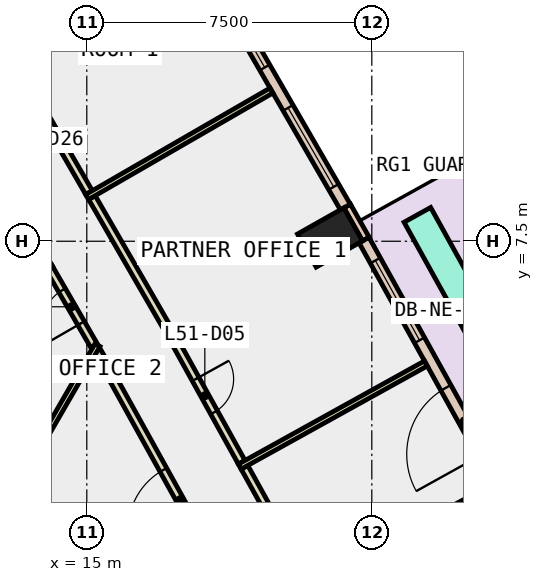
"""IFC4 building model, lengths in metres.
Left out: names, types, materials, properties, quantities, classifications, styles, units other than length and angle.
Written with IfcOpenShell. Run it as: python <this file> out.ifc"""

import sys

from ifc_helpers import new_model, si_unit, direction, frame, frame_2d, origin, origin_2d, place, context, subcontext, project, spatial, rectangle, extrude, element, fill, save


model = new_model("IFC4")
c1 = context("Model", 3, precision=1e-05, world=origin(), true_north=direction((0.0, 1.0)))
c2 = subcontext(c1, "Body", "Model", "MODEL_VIEW")
j1 = project(units=[si_unit("LENGTHUNIT", "METRE"), si_unit("PLANEANGLEUNIT", "RADIAN")], contexts=[c1])
p1 = place(None, origin())
s1 = spatial("IfcSite", under=j1, at=p1, CompositionType="ELEMENT")
p2 = place(p1, origin())
s2 = spatial("IfcBuilding", under=s1, at=p2, CompositionType="ELEMENT")
p3 = place(p2, frame((0.0, 0.0, 227.6)))
s3 = spatial("IfcBuildingStorey", under=s2, at=p3, CompositionType="ELEMENT", Elevation=227.6)
for number, where, z_axis, x_axis in (
    (1, (25.395, 0.391, -0.4), (0.0, 0.0, 1.0), (-0.474, 0.88, 0.0)),
    (2, (21.4, 7.599, -0.4), (0.0, 0.0, 1.0), (-0.491, 0.871, 0.0)),
):
    element("IfcColumn", number, at=place(p3, frame(where, z_axis=z_axis, x_axis=x_axis)), inside=s3, PredefinedType="COLUMN", context=c2, shape_type="SweptSolid", body=[
        extrude(rectangle(XDim=1.0, YDim=1.4, at=origin_2d()), origin(), (0.0, 0.0, 1.0), 4.2),
    ])
p4 = place(p3, frame((22.343, 7.556, 0.0), z_axis=(0.0, 0.0, 1.0), x_axis=(-0.491743606947, 0.87074004446, 0.0)))
e3 = element("IfcWall", 3, at=p4, inside=s3, PredefinedType="STANDARD", context=c2, shape_type="SweptSolid", body=[
    extrude(rectangle(XDim=1.0, YDim=0.2, at=frame_2d((0.5, 0.0))), origin(), (0.0, 0.0, 1.0), 3.8),
])
p5 = place(p3, frame((25.813, 1.183, 0.0), z_axis=(0.0, 0.0, 1.0), x_axis=(-0.484742980126, 0.874656643043, 0.0)))
e4 = element("IfcWall", 4, at=p5, inside=s3, PredefinedType="STANDARD", context=c2, shape_type="SweptSolid", body=[
    extrude(rectangle(XDim=7.258, YDim=0.3, at=frame_2d((3.629, 0.0))), origin(), (0.0, 0.0, 1.0), 3.8),
])
p6 = place(p5, frame((0.814, 0.0, 0.0)))
e5 = element("IfcOpeningElement", 5, at=p6, cuts=e4, PredefinedType="OPENING", context=c2, shape_type="SweptSolid", body=[
    extrude(rectangle(XDim=2.0, YDim=2.4, at=frame_2d((1.0, 1.2))), frame((0.0, 0.16, 0.0), z_axis=(0.0, -1.0, 0.0), x_axis=(1.0, 0.0, 0.0)), (0.0, 0.0, 1.0), 0.32),
])
p7 = place(p5, frame((4.243, 0.0, 0.9)))
e6 = element("IfcOpeningElement", 6, at=p7, cuts=e4, PredefinedType="OPENING", context=c2, shape_type="SweptSolid", body=[
    extrude(rectangle(XDim=2.4, YDim=2.6, at=frame_2d((1.2, 1.3))), frame((0.0, 0.16, 0.0), z_axis=(0.0, -1.0, 0.0), x_axis=(1.0, 0.0, 0.0)), (0.0, 0.0, 1.0), 0.32),
])
p8 = place(p3, frame((21.804, 8.399, 0.0), z_axis=(0.0, 0.0, 1.0), x_axis=(-0.500075798504, 0.865981637075, 0.0)))
e7 = element("IfcWall", 7, at=p8, inside=s3, PredefinedType="STANDARD", context=c2, shape_type="SweptSolid", body=[
    extrude(rectangle(XDim=7.257, YDim=0.3, at=frame_2d((3.628, 0.0))), origin(), (0.0, 0.0, 1.0), 3.8),
])
p9 = place(p8, frame((0.614, 0.0, 0.9)))
e8 = element("IfcOpeningElement", 8, at=p9, cuts=e7, PredefinedType="OPENING", context=c2, shape_type="SweptSolid", body=[
    extrude(rectangle(XDim=2.4, YDim=2.6, at=frame_2d((1.2, 1.3))), frame((0.0, 0.16, 0.0), z_axis=(0.0, -1.0, 0.0), x_axis=(1.0, 0.0, 0.0)), (0.0, 0.0, 1.0), 0.32),
])
p10 = place(p8, frame((4.242, 0.0, 0.9)))
e9 = element("IfcOpeningElement", 9, at=p10, cuts=e7, PredefinedType="OPENING", context=c2, shape_type="SweptSolid", body=[
    extrude(rectangle(XDim=2.4, YDim=2.6, at=frame_2d((1.2, 1.3))), frame((0.0, 0.16, 0.0), z_axis=(0.0, -1.0, 0.0), x_axis=(1.0, 0.0, 0.0)), (0.0, 0.0, 1.0), 0.32),
])
p11 = place(p3, frame((27.121, 2.021, 0.0), z_axis=(0.0, 0.0, 1.0), x_axis=(-0.484785237665, 0.874633222181, 0.0)))
e10 = element("IfcWall", 10, at=p11, inside=s3, PredefinedType="STANDARD", context=c2, shape_type="SweptSolid", body=[
    extrude(rectangle(XDim=7.059, YDim=0.8, at=frame_2d((3.53, 0.0))), origin(), (0.0, 0.0, 1.0), 0.8),
])
p12 = place(p3, frame((15.194, 4.747, 0.0), z_axis=(0.0, 0.0, 1.0), x_axis=(-0.500140598757, 0.865944213836, 0.0)))
e11 = element("IfcWall", 11, at=p12, inside=s3, PredefinedType="PARTITIONING", context=c2, shape_type="SweptSolid", body=[
    extrude(rectangle(XDim=2.375, YDim=0.2, at=frame_2d((1.188, 0.0))), origin(), (0.0, 0.0, 1.0), 3.8),
])
p13 = place(p12, frame((0.688, 0.0, 0.0)))
e12 = element("IfcOpeningElement", 12, at=p13, cuts=e11, PredefinedType="OPENING", context=c2, shape_type="SweptSolid", body=[
    extrude(rectangle(XDim=1.0, YDim=2.1, at=frame_2d((0.5, 1.05))), frame((0.0, 0.11, 0.0), z_axis=(0.0, -1.0, 0.0), x_axis=(1.0, 0.0, 0.0)), (0.0, 0.0, 1.0), 0.22),
])
p14 = place(p3, frame((19.419, -2.856, 0.0), z_axis=(0.0, 0.0, 1.0), x_axis=(-0.484683114876, 0.874689818252, 0.0)))
e13 = element("IfcWall", 13, at=p14, inside=s3, PredefinedType="PARTITIONING", context=c2, shape_type="SweptSolid", body=[
    extrude(rectangle(XDim=8.123, YDim=0.2, at=frame_2d((4.062, 0.0))), origin(), (0.0, 0.0, 1.0), 3.8),
])
p15 = place(p14, frame((3.161, 0.0, 0.0)))
e14 = element("IfcOpeningElement", 14, at=p15, cuts=e13, PredefinedType="OPENING", context=c2, shape_type="SweptSolid", body=[
    extrude(rectangle(XDim=1.8, YDim=2.1, at=frame_2d((0.9, 1.05))), frame((0.0, 0.11, 0.0), z_axis=(0.0, -1.0, 0.0), x_axis=(1.0, 0.0, 0.0)), (0.0, 0.0, 1.0), 0.22),
])
p16 = place(p3, frame((15.482, 4.249, 0.0), z_axis=(0.0, 0.0, 1.0), x_axis=(-0.500832493767, 0.865544229481, 0.0)))
e15 = element("IfcWall", 15, at=p16, inside=s3, PredefinedType="PARTITIONING", context=c2, shape_type="SweptSolid", body=[
    extrude(rectangle(XDim=0.425, YDim=0.2, at=frame_2d((0.212, 0.0))), origin(), (0.0, 0.0, 1.0), 3.8),
])
p17 = place(p3, frame((19.149, 1.553, 0.0), z_axis=(0.0, 0.0, 1.0), x_axis=(0.484622593188, -0.874723351793, 0.0)))
e16 = element("IfcWall", 16, at=p17, inside=s3, PredefinedType="PARTITIONING", context=c2, shape_type="SweptSolid", body=[
    extrude(rectangle(XDim=4.003, YDim=0.2, at=frame_2d((2.002, 0.0))), origin(), (0.0, 0.0, 1.0), 3.8),
])
p18 = place(p3, frame((15.135, 8.65, 0.0), z_axis=(0.0, 0.0, 1.0), x_axis=(0.500102734445, -0.865966081899, 0.0)))
e17 = element("IfcWall", 17, at=p18, inside=s3, PredefinedType="PARTITIONING", context=c2, shape_type="SweptSolid", body=[
    extrude(rectangle(XDim=4.001, YDim=0.2, at=frame_2d((2.0, 0.0))), origin(), (0.0, 0.0, 1.0), 3.8),
])
p19 = place(p3, frame((17.136, 5.185, 0.0), z_axis=(0.0, 0.0, 1.0), x_axis=(0.484679349661, -0.874691904623, 0.0)))
e18 = element("IfcWall", 18, at=p19, inside=s3, PredefinedType="PARTITIONING", context=c2, shape_type="SweptSolid", body=[
    extrude(rectangle(XDim=4.002, YDim=0.2, at=frame_2d((2.001, 0.0))), origin(), (0.0, 0.0, 1.0), 3.8),
])
p20 = place(p19, frame((1.501, 0.0, 0.0)))
e19 = element("IfcOpeningElement", 19, at=p20, cuts=e18, PredefinedType="OPENING", context=c2, shape_type="SweptSolid", body=[
    extrude(rectangle(XDim=1.0, YDim=2.1, at=frame_2d((0.5, 1.05))), frame((0.0, 0.11, 0.0), z_axis=(0.0, -1.0, 0.0), x_axis=(1.0, 0.0, 0.0)), (0.0, 0.0, 1.0), 0.22),
])
p21 = place(p3, frame((13.057, 12.247, 0.0), z_axis=(0.0, 0.0, 1.0), x_axis=(0.500093699572, -0.865971299552, 0.0)))
e20 = element("IfcWall", 20, at=p21, inside=s3, PredefinedType="PARTITIONING", context=c2, shape_type="SweptSolid", body=[
    extrude(rectangle(XDim=4.004, YDim=0.2, at=frame_2d((2.002, 0.0))), origin(), (0.0, 0.0, 1.0), 3.8),
])
p22 = place(p3, frame((19.025, 1.57, 0.0), z_axis=(0.0, 0.0, 1.0), x_axis=(0.874714019242, 0.484639437666, 0.0)))
e21 = element("IfcWall", 21, at=p22, inside=s3, PredefinedType="PARTITIONING", context=c2, shape_type="SweptSolid", body=[
    extrude(rectangle(XDim=5.6, YDim=0.15, at=frame_2d((2.8, 0.0))), origin(), (0.0, 0.0, 1.0), 3.8),
])
p23 = place(p3, frame((15.01, 8.665, 0.0), z_axis=(0.0, 0.0, 1.0), x_axis=(0.865961984968, 0.500109828528, 0.0)))
e22 = element("IfcWall", 22, at=p23, inside=s3, PredefinedType="PARTITIONING", context=c2, shape_type="SweptSolid", body=[
    extrude(rectangle(XDim=5.601, YDim=0.15, at=frame_2d((2.8, 0.0))), origin(), (0.0, 0.0, 1.0), 3.8),
])
p24 = place(p3, frame((9.597, -5.079, 0.0), z_axis=(0.0, 0.0, 1.0), x_axis=(0.499949193323, 0.866054735046, 0.0)))
e23 = element("IfcWall", 23, at=p24, inside=s3, PredefinedType="PARTITIONING", context=c2, shape_type="SweptSolid", body=[
    extrude(rectangle(XDim=11.371, YDim=0.15, at=frame_2d((5.686, 0.0))), origin(), (0.0, 0.0, 1.0), 3.8),
])
p25 = place(p6, origin())
e24 = element("IfcDoor", 24, at=p25, inside=s3, OperationType="SLIDING_TO_LEFT", PredefinedType="DOOR", context=c2, shape_type="SweptSolid", body=[
    extrude(rectangle(XDim=2.0, YDim=2.4, at=frame_2d((1.0, 1.2))), frame((0.0, 0.025, 0.0), z_axis=(0.0, -1.0, 0.0), x_axis=(1.0, 0.0, 0.0)), (0.0, 0.0, 1.0), 0.05),
])
fill(e5, e24)
p26 = place(p7, origin())
e25 = element("IfcWindow", 25, at=p26, inside=s3, PartitioningType="SINGLE_PANEL", PredefinedType="WINDOW", context=c2, shape_type="SweptSolid", body=[
    extrude(rectangle(XDim=2.4, YDim=2.6, at=frame_2d((1.2, 1.3))), frame((0.0, 0.03, 0.0), z_axis=(0.0, -1.0, 0.0), x_axis=(1.0, 0.0, 0.0)), (0.0, 0.0, 1.0), 0.06),
])
fill(e6, e25)
p27 = place(p9, origin())
e26 = element("IfcWindow", 26, at=p27, inside=s3, PartitioningType="SINGLE_PANEL", PredefinedType="WINDOW", context=c2, shape_type="SweptSolid", body=[
    extrude(rectangle(XDim=2.4, YDim=2.6, at=frame_2d((1.2, 1.3))), frame((0.0, 0.03, 0.0), z_axis=(0.0, -1.0, 0.0), x_axis=(1.0, 0.0, 0.0)), (0.0, 0.0, 1.0), 0.06),
])
fill(e8, e26)
p28 = place(p10, origin())
e27 = element("IfcWindow", 27, at=p28, inside=s3, PartitioningType="SINGLE_PANEL", PredefinedType="WINDOW", context=c2, shape_type="SweptSolid", body=[
    extrude(rectangle(XDim=2.4, YDim=2.6, at=frame_2d((1.2, 1.3))), frame((0.0, 0.03, 0.0), z_axis=(0.0, -1.0, 0.0), x_axis=(1.0, 0.0, 0.0)), (0.0, 0.0, 1.0), 0.06),
])
fill(e9, e27)
p29 = place(p20, origin())
e28 = element("IfcDoor", 28, at=p29, inside=s3, OperationType="SINGLE_SWING_LEFT", PredefinedType="DOOR", context=c2, shape_type="SweptSolid", body=[
    extrude(rectangle(XDim=1.0, YDim=2.1, at=frame_2d((0.5, 1.05))), frame((0.0, 0.025, 0.0), z_axis=(0.0, -1.0, 0.0), x_axis=(1.0, 0.0, 0.0)), (0.0, 0.0, 1.0), 0.05),
])
fill(e19, e28)
p30 = place(p15, origin())
e29 = element("IfcDoor", 29, at=p30, inside=s3, OperationType="DOUBLE_DOOR_SINGLE_SWING", PredefinedType="DOOR", context=c2, shape_type="SweptSolid", body=[
    extrude(rectangle(XDim=1.8, YDim=2.1, at=frame_2d((0.9, 1.05))), frame((0.0, 0.025, 0.0), z_axis=(0.0, -1.0, 0.0), x_axis=(1.0, 0.0, 0.0)), (0.0, 0.0, 1.0), 0.05),
])
fill(e14, e29)
p31 = place(p13, origin())
e30 = element("IfcDoor", 30, at=p31, inside=s3, OperationType="SINGLE_SWING_LEFT", PredefinedType="DOOR", context=c2, shape_type="SweptSolid", body=[
    extrude(rectangle(XDim=1.0, YDim=2.1, at=frame_2d((0.5, 1.05))), frame((0.0, 0.025, 0.0), z_axis=(0.0, -1.0, 0.0), x_axis=(1.0, 0.0, 0.0)), (0.0, 0.0, 1.0), 0.05),
])
fill(e12, e30)
save(model, sys.argv[1])
